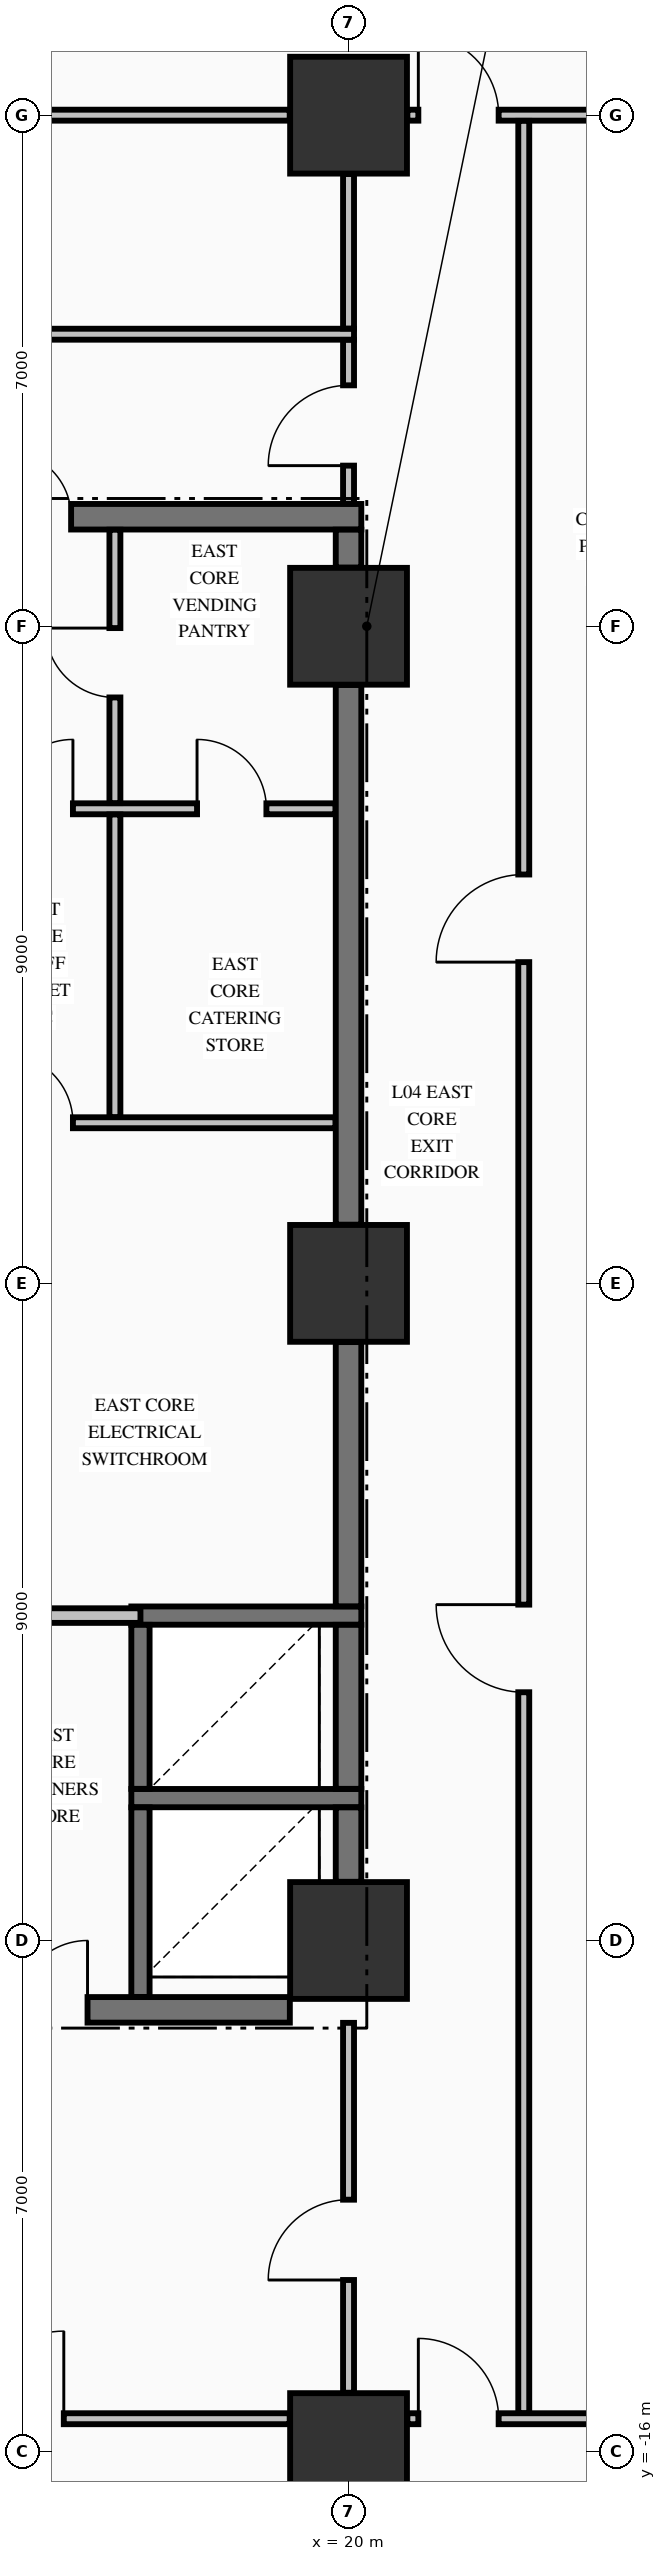
"""IFC4 building model, lengths in metres.
Left out: names, types, materials, properties, quantities, classifications, styles, units other than length and angle.
Written with IfcOpenShell. Run it as: python <this file> out.ifc"""

import sys

from ifc_helpers import new_model, si_unit, direction, frame, frame_2d, origin, origin_2d, place, context, subcontext, project, spatial, rectangle, extrude, element, fill, save


model = new_model("IFC4")
c1 = context("Model", 3, precision=1e-05, world=origin(), true_north=direction((0.0, 1.0)))
c2 = subcontext(c1, "Body", "Model", "MODEL_VIEW")
j1 = project(units=[si_unit("LENGTHUNIT", "METRE"), si_unit("PLANEANGLEUNIT", "RADIAN")], contexts=[c1])
p1 = place(None, origin())
s1 = spatial("IfcSite", under=j1, at=p1, CompositionType="ELEMENT")
p2 = place(p1, origin())
s2 = spatial("IfcBuilding", under=s1, at=p2, CompositionType="ELEMENT")
p3 = place(p2, frame((0.0, 0.0, 21.76)))
s3 = spatial("IfcBuildingStorey", under=s2, at=p3, CompositionType="ELEMENT", Elevation=21.76)
for number, where, z_axis, x_axis in (
    (1, (20.0, -16.0, -0.45), (0.0, 0.0, 1.0), (1.0, 0.0, 0.0)),
    (2, (20.0, -9.0, -0.45), (0.0, 0.0, 1.0), (1.0, 0.0, 0.0)),
    (3, (20.0, 0.0, -0.45), (0.0, 0.0, 1.0), (1.0, 0.0, 0.0)),
    (4, (20.0, 9.0, -0.45), (0.0, 0.0, 1.0), (1.0, 0.0, 0.0)),
    (5, (20.0, 16.0, -0.45), (0.0, 0.0, 1.0), (1.0, 0.0, 0.0)),
):
    element("IfcColumn", number, at=place(p3, frame(where, z_axis=z_axis, x_axis=x_axis)), inside=s3, PredefinedType="COLUMN", context=c2, shape_type="SweptSolid", body=[
        extrude(rectangle(XDim=1.6, YDim=1.6, at=origin_2d()), origin(), (0.0, 0.0, 1.0), 5.44),
    ])
p4 = place(p3, frame((14.7, -9.95, 0.0), z_axis=(0.0, 0.0, 1.0), x_axis=(1.0, 0.0, 0.0)))
e6 = element("IfcWall", 6, at=p4, inside=s3, PredefinedType="SHEAR", context=c2, shape_type="SweptSolid", body=[
    extrude(rectangle(XDim=4.496, YDim=0.35, at=frame_2d((2.248, 0.0))), origin(), (0.0, 0.0, 1.0), 4.99),
])
p5 = place(p4, frame((0.775, 0.0, 0.0)))
e7 = element("IfcOpeningElement", 7, at=p5, cuts=e6, PredefinedType="OPENING", context=c2, shape_type="SweptSolid", body=[
    extrude(rectangle(XDim=0.95, YDim=2.15, at=frame_2d((0.475, 1.075))), frame((0.0, 0.185, 0.0), z_axis=(0.0, -1.0, 0.0), x_axis=(1.0, 0.0, 0.0)), (0.0, 0.0, 1.0), 0.37),
])
for number, where, z_axis, x_axis in (
    (8, (17.025, -7.05, 0.0), (0.0, 0.0, 1.0), (1.0, 0.0, 0.0)),
    (9, (17.025, -4.55, 0.0), (0.0, 0.0, 1.0), (1.0, 0.0, 0.0)),
):
    element("IfcWall", number, at=place(p3, frame(where, z_axis=z_axis, x_axis=x_axis)), inside=s3, PredefinedType="SOLIDWALL", context=c2, shape_type="SweptSolid", body=[
        extrude(rectangle(XDim=3.15, YDim=0.25, at=frame_2d((1.575, 0.0))), origin(), (0.0, 0.0, 1.0), 4.99),
    ])
p6 = place(p3, frame((14.7, 10.5, 0.0), z_axis=(0.0, 0.0, 1.0), x_axis=(1.0, 0.0, 0.0)))
e10 = element("IfcWall", 10, at=p6, inside=s3, PredefinedType="SHEAR", context=c2, shape_type="SweptSolid", body=[
    extrude(rectangle(XDim=5.475, YDim=0.35, at=frame_2d((2.738, 0.0))), origin(), (0.0, 0.0, 1.0), 4.99),
])
p7 = place(p6, frame((0.6, 0.0, 0.0)))
e11 = element("IfcOpeningElement", 11, at=p7, cuts=e10, PredefinedType="OPENING", context=c2, shape_type="SweptSolid", body=[
    extrude(rectangle(XDim=0.9, YDim=2.15, at=frame_2d((0.45, 1.075))), frame((0.0, 0.185, 0.0), z_axis=(0.0, -1.0, 0.0), x_axis=(1.0, 0.0, 0.0)), (0.0, 0.0, 1.0), 0.37),
])
p8 = place(p3, frame((11.806, -15.55, 0.0), z_axis=(0.0, 0.0, 1.0), x_axis=(1.0, 0.0, 0.0)))
e12 = element("IfcWall", 12, at=p8, inside=s3, PredefinedType="PARTITIONING", context=c2, shape_type="SweptSolid", body=[
    extrude(rectangle(XDim=7.388, YDim=0.15, at=frame_2d((3.694, 0.0))), origin(), (0.0, 0.0, 1.0), 3.332),
])
p9 = place(p8, frame((3.094, 0.0, 0.0)))
e13 = element("IfcOpeningElement", 13, at=p9, cuts=e12, PredefinedType="OPENING", context=c2, shape_type="SweptSolid", body=[
    extrude(rectangle(XDim=1.2, YDim=2.15, at=frame_2d((0.6, 1.075))), frame((0.0, 0.085, 0.0), z_axis=(0.0, -1.0, 0.0), x_axis=(1.0, 0.0, 0.0)), (0.0, 0.0, 1.0), 0.17),
])
p10 = place(p3, frame((20.806, -15.55, 0.0), z_axis=(0.0, 0.0, 1.0), x_axis=(1.0, 0.0, 0.0)))
e14 = element("IfcWall", 14, at=p10, inside=s3, PredefinedType="PARTITIONING", context=c2, shape_type="SweptSolid", body=[
    extrude(rectangle(XDim=4.488, YDim=0.15, at=frame_2d((2.244, 0.0))), origin(), (0.0, 0.0, 1.0), 3.332),
])
p11 = place(p10, frame((0.15, 0.0, 0.0)))
e15 = element("IfcOpeningElement", 15, at=p11, cuts=e14, PredefinedType="OPENING", context=c2, shape_type="SweptSolid", body=[
    extrude(rectangle(XDim=1.1, YDim=2.15, at=frame_2d((0.55, 1.075))), frame((0.0, 0.085, 0.0), z_axis=(0.0, -1.0, 0.0), x_axis=(1.0, 0.0, 0.0)), (0.0, 0.0, 1.0), 0.17),
])
p12 = place(p10, frame((2.844, 0.0, 0.0)))
e16 = element("IfcOpeningElement", 16, at=p12, cuts=e14, PredefinedType="OPENING", context=c2, shape_type="SweptSolid", body=[
    extrude(rectangle(XDim=1.1, YDim=2.15, at=frame_2d((0.55, 1.075))), frame((0.0, 0.085, 0.0), z_axis=(0.0, -1.0, 0.0), x_axis=(1.0, 0.0, 0.0)), (0.0, 0.0, 1.0), 0.17),
])
p13 = place(p3, frame((14.878, -4.55, 0.0), z_axis=(0.0, 0.0, 1.0), x_axis=(1.0, 0.0, 0.0)))
e17 = element("IfcWall", 17, at=p13, inside=s3, PredefinedType="PARTITIONING", context=c2, shape_type="SweptSolid", body=[
    extrude(rectangle(XDim=2.272, YDim=0.2, at=frame_2d((1.136, 0.0))), origin(), (0.0, 0.0, 1.0), 4.99),
])
p14 = place(p3, frame((14.878, 2.2, 0.0), z_axis=(0.0, 0.0, 1.0), x_axis=(1.0, 0.0, 0.0)))
e18 = element("IfcWall", 18, at=p14, inside=s3, PredefinedType="PARTITIONING", context=c2, shape_type="SweptSolid", body=[
    extrude(rectangle(XDim=4.944, YDim=0.15, at=frame_2d((2.472, 0.0))), origin(), (0.0, 0.0, 1.0), 4.99),
])
p15 = place(p14, frame((0.397, 0.0, 0.0)))
e19 = element("IfcOpeningElement", 19, at=p15, cuts=e18, PredefinedType="OPENING", context=c2, shape_type="SweptSolid", body=[
    extrude(rectangle(XDim=0.95, YDim=2.15, at=frame_2d((0.475, 1.075))), frame((0.0, 0.085, 0.0), z_axis=(0.0, -1.0, 0.0), x_axis=(1.0, 0.0, 0.0)), (0.0, 0.0, 1.0), 0.17),
])
p16 = place(p3, frame((14.878, 6.5, 0.0), z_axis=(0.0, 0.0, 1.0), x_axis=(1.0, 0.0, 0.0)))
e20 = element("IfcWall", 20, at=p16, inside=s3, PredefinedType="PARTITIONING", context=c2, shape_type="SweptSolid", body=[
    extrude(rectangle(XDim=4.944, YDim=0.15, at=frame_2d((2.472, 0.0))), origin(), (0.0, 0.0, 1.0), 4.99),
])
p17 = place(p16, frame((0.397, 0.0, 0.0)))
e21 = element("IfcOpeningElement", 21, at=p17, cuts=e20, PredefinedType="OPENING", context=c2, shape_type="SweptSolid", body=[
    extrude(rectangle(XDim=0.95, YDim=2.15, at=frame_2d((0.475, 1.075))), frame((0.0, 0.085, 0.0), z_axis=(0.0, -1.0, 0.0), x_axis=(1.0, 0.0, 0.0)), (0.0, 0.0, 1.0), 0.17),
])
p18 = place(p16, frame((3.047, 0.0, 0.0)))
e22 = element("IfcOpeningElement", 22, at=p18, cuts=e20, PredefinedType="OPENING", context=c2, shape_type="SweptSolid", body=[
    extrude(rectangle(XDim=0.95, YDim=2.15, at=frame_2d((0.475, 1.075))), frame((0.0, 0.085, 0.0), z_axis=(0.0, -1.0, 0.0), x_axis=(1.0, 0.0, 0.0)), (0.0, 0.0, 1.0), 0.17),
])
p19 = place(p3, frame((-20.075, 13.0, 0.0), z_axis=(0.0, 0.0, 1.0), x_axis=(1.0, 0.0, 0.0)))
e23 = element("IfcWall", 23, at=p19, inside=s3, PredefinedType="PARTITIONING", context=c2, shape_type="SweptSolid", body=[
    extrude(rectangle(XDim=40.15, YDim=0.15, at=frame_2d((20.075, 0.0))), origin(), (0.0, 0.0, 1.0), 4.99),
])
p20 = place(p19, frame((9.725, 0.0, 0.0)))
e24 = element("IfcOpeningElement", 24, at=p20, cuts=e23, PredefinedType="OPENING", context=c2, shape_type="SweptSolid", body=[
    extrude(rectangle(XDim=1.1, YDim=2.15, at=frame_2d((0.55, 1.075))), frame((0.0, 0.085, 0.0), z_axis=(0.0, -1.0, 0.0), x_axis=(1.0, 0.0, 0.0)), (0.0, 0.0, 1.0), 0.17),
])
p21 = place(p19, frame((29.325, 0.0, 0.0)))
e25 = element("IfcOpeningElement", 25, at=p21, cuts=e23, PredefinedType="OPENING", context=c2, shape_type="SweptSolid", body=[
    extrude(rectangle(XDim=1.1, YDim=2.15, at=frame_2d((0.55, 1.075))), frame((0.0, 0.085, 0.0), z_axis=(0.0, -1.0, 0.0), x_axis=(1.0, 0.0, 0.0)), (0.0, 0.0, 1.0), 0.17),
])
p22 = place(p3, frame((11.806, 16.0, 0.0), z_axis=(0.0, 0.0, 1.0), x_axis=(1.0, 0.0, 0.0)))
e26 = element("IfcWall", 26, at=p22, inside=s3, PredefinedType="PARTITIONING", context=c2, shape_type="SweptSolid", body=[
    extrude(rectangle(XDim=7.388, YDim=0.15, at=frame_2d((3.694, 0.0))), origin(), (0.0, 0.0, 1.0), 3.332),
])
p23 = place(p3, frame((20.806, 16.0, 0.0), z_axis=(0.0, 0.0, 1.0), x_axis=(1.0, 0.0, 0.0)))
e27 = element("IfcWall", 27, at=p23, inside=s3, PredefinedType="PARTITIONING", context=c2, shape_type="SweptSolid", body=[
    extrude(rectangle(XDim=4.488, YDim=0.15, at=frame_2d((2.244, 0.0))), origin(), (0.0, 0.0, 1.0), 3.332),
])
p24 = place(p23, frame((0.15, 0.0, 0.0)))
e28 = element("IfcOpeningElement", 28, at=p24, cuts=e27, PredefinedType="OPENING", context=c2, shape_type="SweptSolid", body=[
    extrude(rectangle(XDim=1.1, YDim=2.15, at=frame_2d((0.55, 1.075))), frame((0.0, 0.085, 0.0), z_axis=(0.0, -1.0, 0.0), x_axis=(1.0, 0.0, 0.0)), (0.0, 0.0, 1.0), 0.17),
])
p25 = place(p23, frame((2.844, 0.0, 0.0)))
e29 = element("IfcOpeningElement", 29, at=p25, cuts=e27, PredefinedType="OPENING", context=c2, shape_type="SweptSolid", body=[
    extrude(rectangle(XDim=1.1, YDim=2.15, at=frame_2d((0.55, 1.075))), frame((0.0, 0.085, 0.0), z_axis=(0.0, -1.0, 0.0), x_axis=(1.0, 0.0, 0.0)), (0.0, 0.0, 1.0), 0.17),
])
p26 = place(p3, frame((17.15, -9.773, 0.0), z_axis=(0.0, 0.0, 1.0), x_axis=(0.0, 1.0, 0.0)))
e30 = element("IfcWall", 30, at=p26, inside=s3, PredefinedType="SOLIDWALL", context=c2, shape_type="SweptSolid", body=[
    extrude(rectangle(XDim=2.596, YDim=0.25, at=frame_2d((1.298, 0.0))), origin(), (0.0, 0.0, 1.0), 4.99),
])
p27 = place(p3, frame((17.15, -6.923, 0.0), z_axis=(0.0, 0.0, 1.0), x_axis=(0.0, 1.0, 0.0)))
e31 = element("IfcWall", 31, at=p27, inside=s3, PredefinedType="SOLIDWALL", context=c2, shape_type="SweptSolid", body=[
    extrude(rectangle(XDim=2.246, YDim=0.25, at=frame_2d((1.123, 0.0))), origin(), (0.0, 0.0, 1.0), 4.99),
])
p28 = place(p3, frame((20.0, -8.196, 0.0), z_axis=(0.0, 0.0, 1.0), x_axis=(0.0, 1.0, 0.0)))
e32 = element("IfcWall", 32, at=p28, inside=s3, PredefinedType="SHEAR", context=c2, shape_type="SweptSolid", body=[
    extrude(rectangle(XDim=1.019, YDim=0.35, at=frame_2d((0.51, 0.0))), origin(), (0.0, 0.0, 1.0), 4.99),
])
p29 = place(p3, frame((20.0, -6.923, 0.0), z_axis=(0.0, 0.0, 1.0), x_axis=(0.0, 1.0, 0.0)))
e33 = element("IfcWall", 33, at=p29, inside=s3, PredefinedType="SHEAR", context=c2, shape_type="SweptSolid", body=[
    extrude(rectangle(XDim=2.246, YDim=0.35, at=frame_2d((1.123, 0.0))), origin(), (0.0, 0.0, 1.0), 4.99),
])
p30 = place(p3, frame((20.0, -4.423, 0.0), z_axis=(0.0, 0.0, 1.0), x_axis=(0.0, 1.0, 0.0)))
e34 = element("IfcWall", 34, at=p30, inside=s3, PredefinedType="SHEAR", context=c2, shape_type="SweptSolid", body=[
    extrude(rectangle(XDim=3.619, YDim=0.35, at=frame_2d((1.81, 0.0))), origin(), (0.0, 0.0, 1.0), 4.99),
])
p31 = place(p3, frame((20.0, 0.804, 0.0), z_axis=(0.0, 0.0, 1.0), x_axis=(0.0, 1.0, 0.0)))
e35 = element("IfcWall", 35, at=p31, inside=s3, PredefinedType="SHEAR", context=c2, shape_type="SweptSolid", body=[
    extrude(rectangle(XDim=7.392, YDim=0.35, at=frame_2d((3.696, 0.0))), origin(), (0.0, 0.0, 1.0), 4.99),
])
p32 = place(p3, frame((20.0, 9.804, 0.0), z_axis=(0.0, 0.0, 1.0), x_axis=(0.0, 1.0, 0.0)))
e36 = element("IfcWall", 36, at=p32, inside=s3, PredefinedType="SHEAR", context=c2, shape_type="SweptSolid", body=[
    extrude(rectangle(XDim=0.519, YDim=0.35, at=frame_2d((0.26, 0.0))), origin(), (0.0, 0.0, 1.0), 4.99),
])
p33 = place(p3, frame((16.8, 2.278, 0.0), z_axis=(0.0, 0.0, 1.0), x_axis=(0.0, 1.0, 0.0)))
e37 = element("IfcWall", 37, at=p33, inside=s3, PredefinedType="PARTITIONING", context=c2, shape_type="SweptSolid", body=[
    extrude(rectangle(XDim=4.144, YDim=0.15, at=frame_2d((2.072, 0.0))), origin(), (0.0, 0.0, 1.0), 4.99),
])
p34 = place(p3, frame((16.8, 6.578, 0.0), z_axis=(0.0, 0.0, 1.0), x_axis=(0.0, 1.0, 0.0)))
e38 = element("IfcWall", 38, at=p34, inside=s3, PredefinedType="PARTITIONING", context=c2, shape_type="SweptSolid", body=[
    extrude(rectangle(XDim=3.744, YDim=0.15, at=frame_2d((1.872, 0.0))), origin(), (0.0, 0.0, 1.0), 4.99),
])
p35 = place(p34, frame((1.447, 0.0, 0.0)))
e39 = element("IfcOpeningElement", 39, at=p35, cuts=e38, PredefinedType="OPENING", context=c2, shape_type="SweptSolid", body=[
    extrude(rectangle(XDim=0.95, YDim=2.15, at=frame_2d((0.475, 1.075))), frame((0.0, 0.085, 0.0), z_axis=(0.0, -1.0, 0.0), x_axis=(1.0, 0.0, 0.0)), (0.0, 0.0, 1.0), 0.17),
])
p36 = place(p3, frame((20.0, -15.194, 0.0), z_axis=(0.0, 0.0, 1.0), x_axis=(0.0, 1.0, 0.0)))
e40 = element("IfcWall", 40, at=p36, inside=s3, PredefinedType="PARTITIONING", context=c2, shape_type="SweptSolid", body=[
    extrude(rectangle(XDim=5.066, YDim=0.15, at=frame_2d((2.533, 0.0))), origin(), (0.0, 0.0, 1.0), 4.032),
])
p37 = place(p36, frame((1.544, 0.0, 0.0)))
e41 = element("IfcOpeningElement", 41, at=p37, cuts=e40, PredefinedType="OPENING", context=c2, shape_type="SweptSolid", body=[
    extrude(rectangle(XDim=1.1, YDim=2.15, at=frame_2d((0.55, 1.075))), frame((0.0, 0.085, 0.0), z_axis=(0.0, -1.0, 0.0), x_axis=(1.0, 0.0, 0.0)), (0.0, 0.0, 1.0), 0.17),
])
p38 = place(p3, frame((20.0, 10.678, 0.0), z_axis=(0.0, 0.0, 1.0), x_axis=(0.0, 1.0, 0.0)))
e42 = element("IfcWall", 42, at=p38, inside=s3, PredefinedType="PARTITIONING", context=c2, shape_type="SweptSolid", body=[
    extrude(rectangle(XDim=2.244, YDim=0.15, at=frame_2d((1.122, 0.0))), origin(), (0.0, 0.0, 1.0), 3.332),
])
p39 = place(p38, frame((0.522, 0.0, 0.0)))
e43 = element("IfcOpeningElement", 43, at=p39, cuts=e42, PredefinedType="OPENING", context=c2, shape_type="SweptSolid", body=[
    extrude(rectangle(XDim=1.1, YDim=2.15, at=frame_2d((0.55, 1.075))), frame((0.0, 0.085, 0.0), z_axis=(0.0, -1.0, 0.0), x_axis=(1.0, 0.0, 0.0)), (0.0, 0.0, 1.0), 0.17),
])
p40 = place(p3, frame((20.0, 13.078, 0.0), z_axis=(0.0, 0.0, 1.0), x_axis=(0.0, 1.0, 0.0)))
e44 = element("IfcWall", 44, at=p40, inside=s3, PredefinedType="PARTITIONING", context=c2, shape_type="SweptSolid", body=[
    extrude(rectangle(XDim=2.116, YDim=0.15, at=frame_2d((1.058, 0.0))), origin(), (0.0, 0.0, 1.0), 3.332),
])
p41 = place(p3, frame((22.4, -15.472, 0.0), z_axis=(0.0, 0.0, 1.0), x_axis=(0.0, 1.0, 0.0)))
e45 = element("IfcWall", 45, at=p41, inside=s3, PredefinedType="PARTITIONING", context=c2, shape_type="SweptSolid", body=[
    extrude(rectangle(XDim=31.394, YDim=0.15, at=frame_2d((15.697, 0.0))), origin(), (0.0, 0.0, 1.0), 4.99),
])
p42 = place(p41, frame((9.872, 0.0, 0.0)))
e46 = element("IfcOpeningElement", 46, at=p42, cuts=e45, PredefinedType="OPENING", context=c2, shape_type="SweptSolid", body=[
    extrude(rectangle(XDim=1.2, YDim=2.15, at=frame_2d((0.6, 1.075))), frame((0.0, 0.085, 0.0), z_axis=(0.0, -1.0, 0.0), x_axis=(1.0, 0.0, 0.0)), (0.0, 0.0, 1.0), 0.17),
])
p43 = place(p41, frame((19.872, 0.0, 0.0)))
e47 = element("IfcOpeningElement", 47, at=p43, cuts=e45, PredefinedType="OPENING", context=c2, shape_type="SweptSolid", body=[
    extrude(rectangle(XDim=1.2, YDim=2.15, at=frame_2d((0.6, 1.075))), frame((0.0, 0.085, 0.0), z_axis=(0.0, -1.0, 0.0), x_axis=(1.0, 0.0, 0.0)), (0.0, 0.0, 1.0), 0.17),
])
p44 = place(p5, origin())
e48 = element("IfcDoor", 48, at=p44, inside=s3, OperationType="SINGLE_SWING_RIGHT", PredefinedType="DOOR", context=c2, shape_type="SweptSolid", body=[
    extrude(rectangle(XDim=0.95, YDim=2.15, at=frame_2d((0.475, 1.075))), frame((0.0, 0.025, 0.0), z_axis=(0.0, -1.0, 0.0), x_axis=(1.0, 0.0, 0.0)), (0.0, 0.0, 1.0), 0.05),
])
fill(e7, e48)
p45 = place(p7, origin())
e49 = element("IfcDoor", 49, at=p45, inside=s3, OperationType="SINGLE_SWING_LEFT", PredefinedType="DOOR", context=c2, shape_type="SweptSolid", body=[
    extrude(rectangle(XDim=0.9, YDim=2.15, at=frame_2d((0.45, 1.075))), frame((0.0, 0.025, 0.0), z_axis=(0.0, -1.0, 0.0), x_axis=(1.0, 0.0, 0.0)), (0.0, 0.0, 1.0), 0.05),
])
fill(e11, e49)
p46 = place(p17, origin())
e50 = element("IfcDoor", 50, at=p46, inside=s3, OperationType="SINGLE_SWING_RIGHT", PredefinedType="DOOR", context=c2, shape_type="SweptSolid", body=[
    extrude(rectangle(XDim=0.95, YDim=2.15, at=frame_2d((0.475, 1.075))), frame((0.0, 0.025, 0.0), z_axis=(0.0, -1.0, 0.0), x_axis=(1.0, 0.0, 0.0)), (0.0, 0.0, 1.0), 0.05),
])
fill(e21, e50)
p47 = place(p15, origin())
e51 = element("IfcDoor", 51, at=p47, inside=s3, OperationType="SINGLE_SWING_LEFT", PredefinedType="DOOR", context=c2, shape_type="SweptSolid", body=[
    extrude(rectangle(XDim=0.95, YDim=2.15, at=frame_2d((0.475, 1.075))), frame((0.0, 0.025, 0.0), z_axis=(0.0, -1.0, 0.0), x_axis=(1.0, 0.0, 0.0)), (0.0, 0.0, 1.0), 0.05),
])
fill(e19, e51)
p48 = place(p35, origin())
e52 = element("IfcDoor", 52, at=p48, inside=s3, OperationType="SINGLE_SWING_RIGHT", PredefinedType="DOOR", context=c2, shape_type="SweptSolid", body=[
    extrude(rectangle(XDim=0.95, YDim=2.15, at=frame_2d((0.475, 1.075))), frame((0.0, 0.025, 0.0), z_axis=(0.0, -1.0, 0.0), x_axis=(1.0, 0.0, 0.0)), (0.0, 0.0, 1.0), 0.05),
])
fill(e39, e52)
p49 = place(p18, origin())
e53 = element("IfcDoor", 53, at=p49, inside=s3, OperationType="SINGLE_SWING_LEFT", PredefinedType="DOOR", context=c2, shape_type="SweptSolid", body=[
    extrude(rectangle(XDim=0.95, YDim=2.15, at=frame_2d((0.475, 1.075))), frame((0.0, 0.025, 0.0), z_axis=(0.0, -1.0, 0.0), x_axis=(1.0, 0.0, 0.0)), (0.0, 0.0, 1.0), 0.05),
])
fill(e22, e53)
p50 = place(p24, origin())
e54 = element("IfcDoor", 54, at=p50, inside=s3, OperationType="SINGLE_SWING_LEFT", PredefinedType="DOOR", context=c2, shape_type="SweptSolid", body=[
    extrude(rectangle(XDim=1.1, YDim=2.15, at=frame_2d((0.55, 1.075))), frame((0.0, 0.025, 0.0), z_axis=(0.0, -1.0, 0.0), x_axis=(1.0, 0.0, 0.0)), (0.0, 0.0, 1.0), 0.05),
])
fill(e28, e54)
p51 = place(p39, origin())
e55 = element("IfcDoor", 55, at=p51, inside=s3, OperationType="SINGLE_SWING_LEFT", PredefinedType="DOOR", context=c2, shape_type="SweptSolid", body=[
    extrude(rectangle(XDim=1.1, YDim=2.15, at=frame_2d((0.55, 1.075))), frame((0.0, 0.025, 0.0), z_axis=(0.0, -1.0, 0.0), x_axis=(1.0, 0.0, 0.0)), (0.0, 0.0, 1.0), 0.05),
])
fill(e43, e55)
p52 = place(p37, origin())
e56 = element("IfcDoor", 56, at=p52, inside=s3, OperationType="SINGLE_SWING_LEFT", PredefinedType="DOOR", context=c2, shape_type="SweptSolid", body=[
    extrude(rectangle(XDim=1.1, YDim=2.15, at=frame_2d((0.55, 1.075))), frame((0.0, 0.025, 0.0), z_axis=(0.0, -1.0, 0.0), x_axis=(1.0, 0.0, 0.0)), (0.0, 0.0, 1.0), 0.05),
])
fill(e41, e56)
p53 = place(p9, origin())
e57 = element("IfcDoor", 57, at=p53, inside=s3, OperationType="SINGLE_SWING_RIGHT", PredefinedType="DOOR", context=c2, shape_type="SweptSolid", body=[
    extrude(rectangle(XDim=1.2, YDim=2.15, at=frame_2d((0.6, 1.075))), frame((0.0, 0.025, 0.0), z_axis=(0.0, -1.0, 0.0), x_axis=(1.0, 0.0, 0.0)), (0.0, 0.0, 1.0), 0.05),
])
fill(e13, e57)
p54 = place(p11, origin())
e58 = element("IfcDoor", 58, at=p54, inside=s3, OperationType="SINGLE_SWING_LEFT", PredefinedType="DOOR", context=c2, shape_type="SweptSolid", body=[
    extrude(rectangle(XDim=1.1, YDim=2.15, at=frame_2d((0.55, 1.075))), frame((0.0, 0.025, 0.0), z_axis=(0.0, -1.0, 0.0), x_axis=(1.0, 0.0, 0.0)), (0.0, 0.0, 1.0), 0.05),
])
fill(e15, e58)
p55 = place(p42, origin())
e59 = element("IfcDoor", 59, at=p55, inside=s3, OperationType="SINGLE_SWING_RIGHT", PredefinedType="DOOR", context=c2, shape_type="SweptSolid", body=[
    extrude(rectangle(XDim=1.2, YDim=2.15, at=frame_2d((0.6, 1.075))), frame((0.0, 0.025, 0.0), z_axis=(0.0, -1.0, 0.0), x_axis=(1.0, 0.0, 0.0)), (0.0, 0.0, 1.0), 0.05),
])
fill(e46, e59)
p56 = place(p43, origin())
e60 = element("IfcDoor", 60, at=p56, inside=s3, OperationType="SINGLE_SWING_LEFT", PredefinedType="DOOR", context=c2, shape_type="SweptSolid", body=[
    extrude(rectangle(XDim=1.2, YDim=2.15, at=frame_2d((0.6, 1.075))), frame((0.0, 0.025, 0.0), z_axis=(0.0, -1.0, 0.0), x_axis=(1.0, 0.0, 0.0)), (0.0, 0.0, 1.0), 0.05),
])
fill(e47, e60)
save(model, sys.argv[1])
